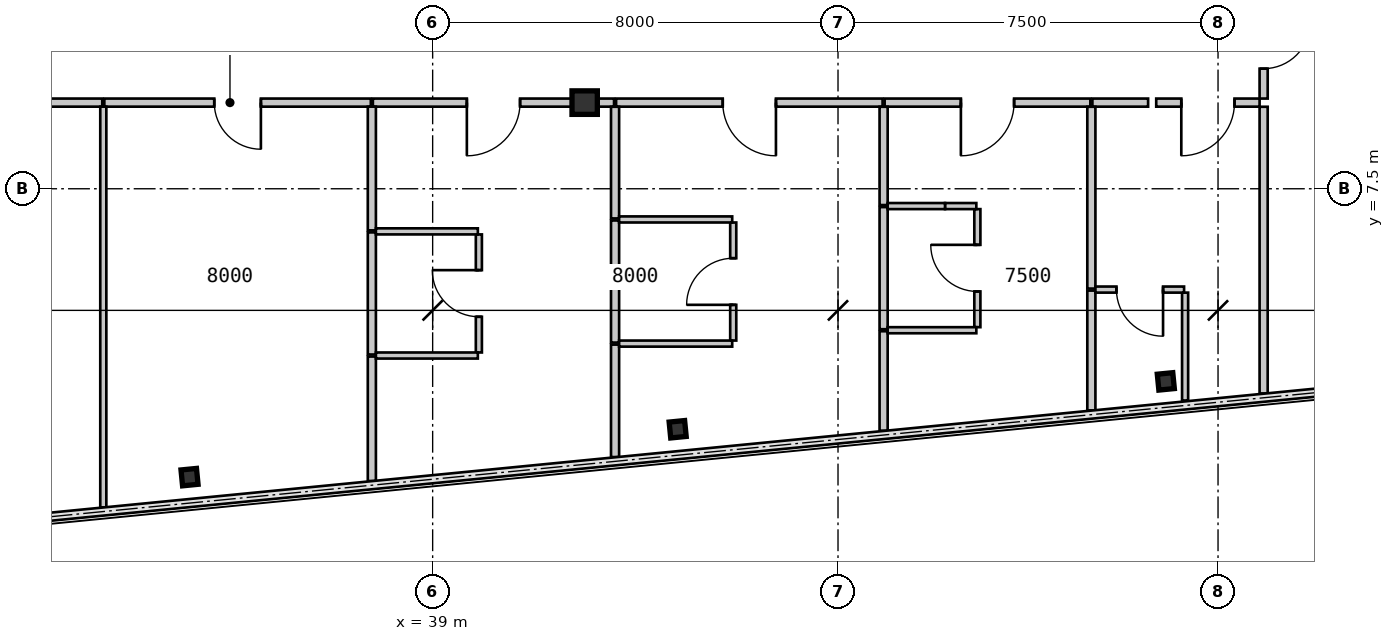
"""IFC4 building model, lengths in metres.
Left out: names, types, materials, properties, quantities, classifications, styles, units other than length and angle.
Written with IfcOpenShell. Run it as: python <this file> out.ifc"""

import sys

from ifc_helpers import new_model, si_unit, direction, frame, frame_2d, origin, origin_2d, place, context, subcontext, project, spatial, rectangle, i_section, extrude, source, transform, mapped, element, fill, save


model = new_model("IFC4")
c1 = context("Model", 3, precision=1e-05, world=origin(), true_north=direction((0.0, 1.0)))
c2 = subcontext(c1, "Body", "Model", "MODEL_VIEW")
j1 = project(units=[si_unit("LENGTHUNIT", "METRE"), si_unit("PLANEANGLEUNIT", "RADIAN")], contexts=[c1])
p1 = place(None, origin())
s1 = spatial("IfcSite", under=j1, at=p1, CompositionType="ELEMENT")
p2 = place(p1, origin())
s2 = spatial("IfcBuilding", under=s1, at=p2, CompositionType="ELEMENT")
p3 = place(p2, frame((0.0, 0.0, 68.25)))
s3 = spatial("IfcBuildingStorey", under=s2, at=p3, CompositionType="ELEMENT", Elevation=68.25)
m1 = source(origin(), c2, "Body", "SweptSolid", [
    extrude(i_section(OverallWidth=0.5, OverallDepth=0.464, WebThickness=0.022, FlangeThickness=0.034, at=origin_2d()), origin(), (0.0, 0.0, 1.0), 3.15),
])
p4 = place(p3, frame((42.0, 9.2, 0.0), z_axis=(0.0, 0.0, 1.0), x_axis=(1.0, 0.0, 0.0)))
e1 = element("IfcColumn", 1, at=p4, inside=s3, PredefinedType="COLUMN", context=c2, shape_type="MappedRepresentation", body=[
    mapped(m1, transform((0.0, 0.0, 0.0), scale=1.0)),
])
m2 = source(origin(), c2, "Body", "SweptSolid", [
    extrude(i_section(OverallWidth=0.307, OverallDepth=0.315, WebThickness=0.012, FlangeThickness=0.019, at=origin_2d()), origin(), (0.0, 0.0, 1.0), 3.15),
])
for number, where, z_axis, x_axis in (
    (2, (34.202, 1.809, 0.0), (0.0, 0.0, 1.0), (0.995, 0.098, 0.0)),
    (3, (43.835, 2.754, 0.0), (0.0, 0.0, 1.0), (0.995, 0.098, 0.0)),
    (4, (53.469, 3.698, 0.0), (0.0, 0.0, 1.0), (0.995, 0.098, 0.0)),
):
    element("IfcColumn", number, at=place(p3, frame(where, z_axis=z_axis, x_axis=x_axis)), inside=s3, PredefinedType="COLUMN", context=c2, shape_type="MappedRepresentation", body=[
        mapped(m2, transform((0.0, 0.0, 0.0), scale=1.0)),
    ])
m3 = source(origin(), c2, "Body", "SweptSolid", [
    extrude(rectangle(XDim=2.04, YDim=0.16, at=frame_2d((1.02, 0.0))), origin(), (0.0, 0.0, 1.0), 2.93),
])
p5 = place(p3, frame((55.32, 9.2, 0.0), z_axis=(0.0, 0.0, 1.0), x_axis=(-1.0, 0.0, 0.0)))
e5 = element("IfcWall", 5, at=p5, inside=s3, PredefinedType="PARTITIONING", context=c2, shape_type="MappedRepresentation", body=[
    mapped(m3, transform((0.0, 0.0, 0.0), scale=1.0)),
])
m4 = source(origin(), c2, "Body", "SweptSolid", [
    extrude(rectangle(XDim=1.05, YDim=2.1, at=frame_2d((0.525, 1.05))), frame((0.0, 0.09, 0.0), z_axis=(0.0, -1.0, 0.0), x_axis=(1.0, 0.0, 0.0)), (0.0, 0.0, 1.0), 0.18),
])
p6 = place(p5, frame((0.495, 0.0, 0.0)))
e6 = element("IfcOpeningElement", 6, at=p6, cuts=e5, PredefinedType="OPENING", context=c2, shape_type="MappedRepresentation", body=[
    mapped(m4, transform((0.0, 0.0, 0.0), scale=1.0)),
])
m5 = source(origin(), c2, "Body", "SweptSolid", [
    extrude(rectangle(XDim=2.1, YDim=0.16, at=frame_2d((1.05, 0.0))), origin(), (0.0, 0.0, 1.0), 2.93),
])
p7 = place(p3, frame((55.4, 11.38, 0.0), z_axis=(0.0, 0.0, 1.0), x_axis=(0.0, -1.0, 0.0)))
e7 = element("IfcWall", 7, at=p7, inside=s3, PredefinedType="PARTITIONING", context=c2, shape_type="MappedRepresentation", body=[
    mapped(m5, transform((0.0, 0.0, 0.0), scale=1.0)),
])
m6 = source(origin(), c2, "Body", "SweptSolid", [
    extrude(rectangle(XDim=0.92, YDim=2.1, at=frame_2d((0.46, 1.05))), frame((0.0, 0.09, 0.0), z_axis=(0.0, -1.0, 0.0), x_axis=(1.0, 0.0, 0.0)), (0.0, 0.0, 1.0), 0.18),
])
p8 = place(p7, frame((0.59, 0.0, 0.0)))
e8 = element("IfcOpeningElement", 8, at=p8, cuts=e7, PredefinedType="OPENING", context=c2, shape_type="MappedRepresentation", body=[
    mapped(m6, transform((0.0, 0.0, 0.0), scale=1.0)),
])
m7 = source(origin(), c2, "Body", "SweptSolid", [
    extrude(rectangle(XDim=4.48, YDim=0.16, at=frame_2d((2.24, 0.0))), origin(), (0.0, 0.0, 1.0), 2.328),
])
p9 = place(p3, frame((32.48, 9.2, 0.0), z_axis=(0.0, 0.0, 1.0), x_axis=(-1.0, 0.0, 0.0)))
e9 = element("IfcWall", 9, at=p9, inside=s3, PredefinedType="PARTITIONING", context=c2, shape_type="MappedRepresentation", body=[
    mapped(m7, transform((0.0, 0.0, 0.0), scale=1.0)),
])
p10 = place(p9, frame((1.97, 0.0, 0.0)))
e10 = element("IfcOpeningElement", 10, at=p10, cuts=e9, PredefinedType="OPENING", context=c2, shape_type="MappedRepresentation", body=[
    mapped(m6, transform((0.0, 0.0, 0.0), scale=1.0)),
])
m8 = source(origin(), c2, "Body", "SweptSolid", [
    extrude(rectangle(XDim=5.26, YDim=0.16, at=frame_2d((2.63, 0.0))), origin(), (0.0, 0.0, 1.0), 2.328),
])
p11 = place(p3, frame((37.78, 9.2, 0.0), z_axis=(0.0, 0.0, 1.0), x_axis=(-1.0, 0.0, 0.0)))
e11 = element("IfcWall", 11, at=p11, inside=s3, PredefinedType="PARTITIONING", context=c2, shape_type="MappedRepresentation", body=[
    mapped(m8, transform((0.0, 0.0, 0.0), scale=1.0)),
])
p12 = place(p11, frame((2.17, 0.0, 0.0)))
e12 = element("IfcOpeningElement", 12, at=p12, cuts=e11, PredefinedType="OPENING", context=c2, shape_type="MappedRepresentation", body=[
    mapped(m6, transform((0.0, 0.0, 0.0), scale=1.0)),
])
m9 = source(origin(), c2, "Body", "SweptSolid", [
    extrude(rectangle(XDim=0.58, YDim=0.16, at=frame_2d((0.29, 0.0))), origin(), (0.0, 0.0, 1.0), 2.93),
])
p13 = place(p3, frame((42.58, 9.2, 0.0), z_axis=(0.0, 0.0, 1.0), x_axis=(-1.0, 0.0, 0.0)))
e13 = element("IfcWall", 13, at=p13, inside=s3, PredefinedType="PARTITIONING", context=c2, shape_type="MappedRepresentation", body=[
    mapped(m9, transform((0.0, 0.0, 0.0), scale=1.0)),
])
m10 = source(origin(), c2, "Body", "SweptSolid", [
    extrude(rectangle(XDim=4.18, YDim=0.16, at=frame_2d((2.09, 0.0))), origin(), (0.0, 0.0, 1.0), 2.328),
])
p14 = place(p3, frame((42.0, 9.2, 0.0), z_axis=(0.0, 0.0, 1.0), x_axis=(-1.0, 0.0, 0.0)))
e14 = element("IfcWall", 14, at=p14, inside=s3, PredefinedType="PARTITIONING", context=c2, shape_type="MappedRepresentation", body=[
    mapped(m10, transform((0.0, 0.0, 0.0), scale=1.0)),
])
p15 = place(p14, frame((1.275, 0.0, 0.0)))
e15 = element("IfcOpeningElement", 15, at=p15, cuts=e14, PredefinedType="OPENING", context=c2, shape_type="MappedRepresentation", body=[
    mapped(m4, transform((0.0, 0.0, 0.0), scale=1.0)),
])
m11 = source(origin(), c2, "Body", "SweptSolid", [
    extrude(rectangle(XDim=5.259, YDim=0.16, at=frame_2d((2.63, 0.0))), origin(), (0.0, 0.0, 1.0), 2.93),
])
p16 = place(p3, frame((47.88, 9.2, 0.0), z_axis=(0.0, 0.0, 1.0), x_axis=(-1.0, 0.0, 0.0)))
e16 = element("IfcWall", 16, at=p16, inside=s3, PredefinedType="PARTITIONING", context=c2, shape_type="MappedRepresentation", body=[
    mapped(m11, transform((0.0, 0.0, 0.0), scale=1.0)),
])
p17 = place(p16, frame((2.105, 0.0, 0.0)))
e17 = element("IfcOpeningElement", 17, at=p17, cuts=e16, PredefinedType="OPENING", context=c2, shape_type="MappedRepresentation", body=[
    mapped(m4, transform((0.0, 0.0, 0.0), scale=1.0)),
])
m12 = source(origin(), c2, "Body", "SweptSolid", [
    extrude(rectangle(XDim=4.059, YDim=0.16, at=frame_2d((2.03, 0.0))), origin(), (0.0, 0.0, 1.0), 2.93),
])
p18 = place(p3, frame((51.98, 9.2, 0.0), z_axis=(0.0, 0.0, 1.0), x_axis=(-1.0, 0.0, 0.0)))
e18 = element("IfcWall", 18, at=p18, inside=s3, PredefinedType="PARTITIONING", context=c2, shape_type="MappedRepresentation", body=[
    mapped(m12, transform((0.0, 0.0, 0.0), scale=1.0)),
])
p19 = place(p18, frame((1.505, 0.0, 0.0)))
e19 = element("IfcOpeningElement", 19, at=p19, cuts=e18, PredefinedType="OPENING", context=c2, shape_type="MappedRepresentation", body=[
    mapped(m4, transform((0.0, 0.0, 0.0), scale=1.0)),
])
m13 = source(origin(), c2, "Body", "SweptSolid", [
    extrude(rectangle(XDim=1.1, YDim=0.16, at=frame_2d((0.55, 0.0))), origin(), (0.0, 0.0, 1.0), 2.93),
])
p20 = place(p3, frame((53.12, 9.2, 0.0), z_axis=(0.0, 0.0, 1.0), x_axis=(-1.0, 0.0, 0.0)))
e20 = element("IfcWall", 20, at=p20, inside=s3, PredefinedType="PARTITIONING", context=c2, shape_type="MappedRepresentation", body=[
    mapped(m13, transform((0.0, 0.0, 0.0), scale=1.0)),
])
m14 = source(origin(), c2, "Body", "SweptSolid", [
    extrude(rectangle(XDim=7.907, YDim=0.12, at=frame_2d((3.954, 0.0))), origin(), (0.0, 0.0, 1.0), 2.93),
])
p21 = place(p3, frame((32.5, 9.12, 0.0), z_axis=(0.0, 0.0, 1.0), x_axis=(0.0, -1.0, 0.0)))
e21 = element("IfcWall", 21, at=p21, inside=s3, PredefinedType="PARTITIONING", context=c2, shape_type="MappedRepresentation", body=[
    mapped(m14, transform((0.0, 0.0, 0.0), scale=1.0)),
])
m15 = source(origin(), c2, "Body", "SweptSolid", [
    extrude(rectangle(XDim=2.456, YDim=0.16, at=frame_2d((1.228, 0.0))), origin(), (0.0, 0.0, 1.0), 2.93),
])
p22 = place(p3, frame((37.8, 4.189, 0.0), z_axis=(0.0, 0.0, 1.0), x_axis=(0.0, -1.0, 0.0)))
e22 = element("IfcWall", 22, at=p22, inside=s3, PredefinedType="PARTITIONING", context=c2, shape_type="MappedRepresentation", body=[
    mapped(m15, transform((0.0, 0.0, 0.0), scale=1.0)),
])
m16 = source(origin(), c2, "Body", "SweptSolid", [
    extrude(rectangle(XDim=2.441, YDim=0.16, at=frame_2d((1.22, 0.0))), origin(), (0.0, 0.0, 1.0), 2.93),
])
p23 = place(p3, frame((37.8, 9.12, 0.0), z_axis=(0.0, 0.0, 1.0), x_axis=(0.0, -1.0, 0.0)))
e23 = element("IfcWall", 23, at=p23, inside=s3, PredefinedType="PARTITIONING", context=c2, shape_type="MappedRepresentation", body=[
    mapped(m16, transform((0.0, 0.0, 0.0), scale=1.0)),
])
m17 = source(origin(), c2, "Body", "SweptSolid", [
    extrude(rectangle(XDim=2.41, YDim=0.16, at=frame_2d((1.205, 0.0))), origin(), (0.0, 0.0, 1.0), 2.93),
])
p24 = place(p3, frame((37.8, 6.639, 0.0), z_axis=(0.0, 0.0, 1.0), x_axis=(0.0, -1.0, 0.0)))
e24 = element("IfcWall", 24, at=p24, inside=s3, PredefinedType="PARTITIONING", context=c2, shape_type="MappedRepresentation", body=[
    mapped(m17, transform((0.0, 0.0, 0.0), scale=1.0)),
])
m18 = source(origin(), c2, "Body", "SweptSolid", [
    extrude(rectangle(XDim=2.33, YDim=0.12, at=frame_2d((1.165, 0.0))), origin(), (0.0, 0.0, 1.0), 2.93),
])
p25 = place(p3, frame((39.912, 4.269, 0.0), z_axis=(0.0, 0.0, 1.0), x_axis=(0.0, 1.0, 0.0)))
e25 = element("IfcWall", 25, at=p25, inside=s3, PredefinedType="PARTITIONING", context=c2, shape_type="MappedRepresentation", body=[
    mapped(m18, transform((0.0, 0.0, 0.0), scale=1.0)),
])
m19 = source(origin(), c2, "Body", "SweptSolid", [
    extrude(rectangle(XDim=0.92, YDim=2.1, at=frame_2d((0.46, 1.05))), frame((0.0, 0.07, 0.0), z_axis=(0.0, -1.0, 0.0), x_axis=(1.0, 0.0, 0.0)), (0.0, 0.0, 1.0), 0.14),
])
p26 = place(p25, frame((0.705, 0.0, 0.0)))
e26 = element("IfcOpeningElement", 26, at=p26, cuts=e25, PredefinedType="OPENING", context=c2, shape_type="MappedRepresentation", body=[
    mapped(m19, transform((0.0, 0.0, 0.0), scale=1.0)),
])
m20 = source(origin(), c2, "Body", "SweptSolid", [
    extrude(rectangle(XDim=2.012, YDim=0.12, at=frame_2d((1.006, 0.0))), origin(), (0.0, 0.0, 1.0), 2.93),
])
for number, where, z_axis, x_axis in (
    (27, (37.88, 4.209, 0.0), (0.0, 0.0, 1.0), (1.0, 0.0, 0.0)),
    (28, (39.892, 6.659, 0.0), (0.0, 0.0, 1.0), (-1.0, 0.0, 0.0)),
):
    element("IfcWall", number, at=place(p3, frame(where, z_axis=z_axis, x_axis=x_axis)), inside=s3, PredefinedType="PARTITIONING", context=c2, shape_type="MappedRepresentation", body=[
        mapped(m20, transform((0.0, 0.0, 0.0), scale=1.0)),
    ])
m21 = source(origin(), c2, "Body", "SweptSolid", [
    extrude(rectangle(XDim=2.219, YDim=0.16, at=frame_2d((1.11, 0.0))), origin(), (0.0, 0.0, 1.0), 2.93),
])
p27 = place(p3, frame((42.6, 4.424, 0.0), z_axis=(0.0, 0.0, 1.0), x_axis=(0.0, -1.0, 0.0)))
e29 = element("IfcWall", 29, at=p27, inside=s3, PredefinedType="PARTITIONING", context=c2, shape_type="MappedRepresentation", body=[
    mapped(m21, transform((0.0, 0.0, 0.0), scale=1.0)),
])
m22 = source(origin(), c2, "Body", "SweptSolid", [
    extrude(rectangle(XDim=2.203, YDim=0.16, at=frame_2d((1.102, 0.0))), origin(), (0.0, 0.0, 1.0), 2.93),
])
p28 = place(p3, frame((42.6, 9.118, 0.0), z_axis=(0.0, 0.0, 1.0), x_axis=(0.0, -1.0, 0.0)))
e30 = element("IfcWall", 30, at=p28, inside=s3, PredefinedType="PARTITIONING", context=c2, shape_type="MappedRepresentation", body=[
    mapped(m22, transform((0.0, 0.0, 0.0), scale=1.0)),
])
m23 = source(origin(), c2, "Body", "SweptSolid", [
    extrude(rectangle(XDim=2.409, YDim=0.16, at=frame_2d((1.205, 0.0))), origin(), (0.0, 0.0, 1.0), 2.93),
])
p29 = place(p3, frame((42.6, 6.874, 0.0), z_axis=(0.0, 0.0, 1.0), x_axis=(0.0, -1.0, 0.0)))
e31 = element("IfcWall", 31, at=p29, inside=s3, PredefinedType="PARTITIONING", context=c2, shape_type="MappedRepresentation", body=[
    mapped(m23, transform((0.0, 0.0, 0.0), scale=1.0)),
])
m24 = source(origin(), c2, "Body", "SweptSolid", [
    extrude(rectangle(XDim=2.33, YDim=0.12, at=frame_2d((1.165, 0.0))), origin(), (0.0, 0.0, 1.0), 2.93),
])
p30 = place(p3, frame((44.932, 4.504, 0.0), z_axis=(0.0, 0.0, 1.0), x_axis=(0.0, 1.0, 0.0)))
e32 = element("IfcWall", 32, at=p30, inside=s3, PredefinedType="PARTITIONING", context=c2, shape_type="MappedRepresentation", body=[
    mapped(m24, transform((0.0, 0.0, 0.0), scale=1.0)),
])
p31 = place(p30, frame((0.705, 0.0, 0.0)))
e33 = element("IfcOpeningElement", 33, at=p31, cuts=e32, PredefinedType="OPENING", context=c2, shape_type="MappedRepresentation", body=[
    mapped(m19, transform((0.0, 0.0, 0.0), scale=1.0)),
])
m25 = source(origin(), c2, "Body", "SweptSolid", [
    extrude(rectangle(XDim=2.232, YDim=0.12, at=frame_2d((1.116, 0.0))), origin(), (0.0, 0.0, 1.0), 2.93),
])
for number, where, z_axis, x_axis in (
    (34, (42.68, 4.444, 0.0), (0.0, 0.0, 1.0), (1.0, 0.0, 0.0)),
    (35, (44.912, 6.894, 0.0), (0.0, 0.0, 1.0), (-1.0, 0.0, 0.0)),
):
    element("IfcWall", number, at=place(p3, frame(where, z_axis=z_axis, x_axis=x_axis)), inside=s3, PredefinedType="PARTITIONING", context=c2, shape_type="MappedRepresentation", body=[
        mapped(m25, transform((0.0, 0.0, 0.0), scale=1.0)),
    ])
m26 = source(origin(), c2, "Body", "SweptSolid", [
    extrude(rectangle(XDim=1.963, YDim=0.16, at=frame_2d((0.982, 0.0))), origin(), (0.0, 0.0, 1.0), 2.93),
])
p32 = place(p3, frame((47.9, 4.688, 0.0), z_axis=(0.0, 0.0, 1.0), x_axis=(0.0, -1.0, 0.0)))
e36 = element("IfcWall", 36, at=p32, inside=s3, PredefinedType="PARTITIONING", context=c2, shape_type="MappedRepresentation", body=[
    mapped(m26, transform((0.0, 0.0, 0.0), scale=1.0)),
])
m27 = source(origin(), c2, "Body", "SweptSolid", [
    extrude(rectangle(XDim=1.939, YDim=0.16, at=frame_2d((0.97, 0.0))), origin(), (0.0, 0.0, 1.0), 2.93),
])
p33 = place(p3, frame((47.9, 9.118, 0.0), z_axis=(0.0, 0.0, 1.0), x_axis=(0.0, -1.0, 0.0)))
e37 = element("IfcWall", 37, at=p33, inside=s3, PredefinedType="PARTITIONING", context=c2, shape_type="MappedRepresentation", body=[
    mapped(m27, transform((0.0, 0.0, 0.0), scale=1.0)),
])
m28 = source(origin(), c2, "Body", "SweptSolid", [
    extrude(rectangle(XDim=2.41, YDim=0.16, at=frame_2d((1.205, 0.0))), origin(), (0.0, 0.0, 1.0), 2.93),
])
p34 = place(p3, frame((47.9, 7.138, 0.0), z_axis=(0.0, 0.0, 1.0), x_axis=(0.0, -1.0, 0.0)))
e38 = element("IfcWall", 38, at=p34, inside=s3, PredefinedType="PARTITIONING", context=c2, shape_type="MappedRepresentation", body=[
    mapped(m28, transform((0.0, 0.0, 0.0), scale=1.0)),
])
p35 = place(p3, frame((49.75, 4.768, 0.0), z_axis=(0.0, 0.0, 1.0), x_axis=(0.0, 1.0, 0.0)))
e39 = element("IfcWall", 39, at=p35, inside=s3, PredefinedType="PARTITIONING", context=c2, shape_type="MappedRepresentation", body=[
    mapped(m18, transform((0.0, 0.0, 0.0), scale=1.0)),
])
p36 = place(p35, frame((0.705, 0.0, 0.0)))
e40 = element("IfcOpeningElement", 40, at=p36, cuts=e39, PredefinedType="OPENING", context=c2, shape_type="MappedRepresentation", body=[
    mapped(m19, transform((0.0, 0.0, 0.0), scale=1.0)),
])
m29 = source(origin(), c2, "Body", "SweptSolid", [
    extrude(rectangle(XDim=1.75, YDim=0.12, at=frame_2d((0.875, 0.0))), origin(), (0.0, 0.0, 1.0), 2.93),
])
p37 = place(p3, frame((47.98, 4.708, 0.0), z_axis=(0.0, 0.0, 1.0), x_axis=(1.0, 0.0, 0.0)))
e41 = element("IfcWall", 41, at=p37, inside=s3, PredefinedType="PARTITIONING", context=c2, shape_type="MappedRepresentation", body=[
    mapped(m29, transform((0.0, 0.0, 0.0), scale=1.0)),
])
m30 = source(origin(), c2, "Body", "SweptSolid", [
    extrude(rectangle(XDim=0.618, YDim=0.12, at=frame_2d((0.309, 0.0))), origin(), (0.0, 0.0, 1.0), 2.93),
])
p38 = place(p3, frame((49.73, 7.158, 0.0), z_axis=(0.0, 0.0, 1.0), x_axis=(-1.0, 0.0, 0.0)))
e42 = element("IfcWall", 42, at=p38, inside=s3, PredefinedType="PARTITIONING", context=c2, shape_type="MappedRepresentation", body=[
    mapped(m30, transform((0.0, 0.0, 0.0), scale=1.0)),
])
m31 = source(origin(), c2, "Body", "SweptSolid", [
    extrude(rectangle(XDim=1.132, YDim=0.12, at=frame_2d((0.566, 0.0))), origin(), (0.0, 0.0, 1.0), 2.47),
])
p39 = place(p3, frame((49.112, 7.158, 0.0), z_axis=(0.0, 0.0, 1.0), x_axis=(-1.0, 0.0, 0.0)))
e43 = element("IfcWall", 43, at=p39, inside=s3, PredefinedType="PARTITIONING", context=c2, shape_type="MappedRepresentation", body=[
    mapped(m31, transform((0.0, 0.0, 0.0), scale=1.0)),
])
m32 = source(origin(), c2, "Body", "SweptSolid", [
    extrude(rectangle(XDim=3.587, YDim=0.16, at=frame_2d((1.794, 0.0))), origin(), (0.0, 0.0, 1.0), 2.93),
])
p40 = place(p3, frame((52.0, 9.118, 0.0), z_axis=(0.0, 0.0, 1.0), x_axis=(0.0, -1.0, 0.0)))
e44 = element("IfcWall", 44, at=p40, inside=s3, PredefinedType="PARTITIONING", context=c2, shape_type="MappedRepresentation", body=[
    mapped(m32, transform((0.0, 0.0, 0.0), scale=1.0)),
])
m33 = source(origin(), c2, "Body", "SweptSolid", [
    extrude(rectangle(XDim=2.364, YDim=0.16, at=frame_2d((1.182, 0.0))), origin(), (0.0, 0.0, 1.0), 2.93),
])
p41 = place(p3, frame((52.0, 5.49, 0.0), z_axis=(0.0, 0.0, 1.0), x_axis=(0.0, -1.0, 0.0)))
e45 = element("IfcWall", 45, at=p41, inside=s3, PredefinedType="PARTITIONING", context=c2, shape_type="MappedRepresentation", body=[
    mapped(m33, transform((0.0, 0.0, 0.0), scale=1.0)),
])
m34 = source(origin(), c2, "Body", "SweptSolid", [
    extrude(rectangle(XDim=2.128, YDim=0.12, at=frame_2d((1.064, 0.0))), origin(), (0.0, 0.0, 1.0), 2.93),
])
p42 = place(p3, frame((53.85, 3.322, 0.0), z_axis=(0.0, 0.0, 1.0), x_axis=(0.0, 1.0, 0.0)))
e46 = element("IfcWall", 46, at=p42, inside=s3, PredefinedType="PARTITIONING", context=c2, shape_type="MappedRepresentation", body=[
    mapped(m34, transform((0.0, 0.0, 0.0), scale=1.0)),
])
p43 = place(p3, frame((53.83, 5.51, 0.0), z_axis=(0.0, 0.0, 1.0), x_axis=(-1.0, 0.0, 0.0)))
e47 = element("IfcWall", 47, at=p43, inside=s3, PredefinedType="PARTITIONING", context=c2, shape_type="MappedRepresentation", body=[
    mapped(m29, transform((0.0, 0.0, 0.0), scale=1.0)),
])
p44 = place(p43, frame((0.415, 0.0, 0.0)))
e48 = element("IfcOpeningElement", 48, at=p44, cuts=e47, PredefinedType="OPENING", context=c2, shape_type="MappedRepresentation", body=[
    mapped(m19, transform((0.0, 0.0, 0.0), scale=1.0)),
])
m35 = source(origin(), c2, "Body", "SweptSolid", [
    extrude(rectangle(XDim=5.658, YDim=0.16, at=frame_2d((2.829, 0.0))), origin(), (0.0, 0.0, 1.0), 2.93),
])
p45 = place(p3, frame((55.4, 9.118, 0.0), z_axis=(0.0, 0.0, 1.0), x_axis=(0.0, -1.0, 0.0)))
e49 = element("IfcWall", 49, at=p45, inside=s3, PredefinedType="PARTITIONING", context=c2, shape_type="MappedRepresentation", body=[
    mapped(m35, transform((0.0, 0.0, 0.0), scale=1.0)),
])
m36 = source(origin(), c2, "Body", "SweptSolid", [
    extrude(rectangle(XDim=1.05, YDim=2.1, at=frame_2d((0.525, 1.05))), frame((0.0, 0.025, 0.0), z_axis=(0.0, -1.0, 0.0), x_axis=(1.0, 0.0, 0.0)), (0.0, 0.0, 1.0), 0.05),
])
p46 = place(p6, origin())
e50 = element("IfcDoor", 50, at=p46, inside=s3, OperationType="SINGLE_SWING_RIGHT", PredefinedType="DOOR", context=c2, shape_type="MappedRepresentation", body=[
    mapped(m36, transform((0.0, 0.0, 0.0), scale=1.0)),
])
fill(e6, e50)
m37 = source(origin(), c2, "Body", "SweptSolid", [
    extrude(rectangle(XDim=0.92, YDim=2.1, at=frame_2d((0.46, 1.05))), frame((0.0, 0.025, 0.0), z_axis=(0.0, -1.0, 0.0), x_axis=(1.0, 0.0, 0.0)), (0.0, 0.0, 1.0), 0.05),
])
p47 = place(p8, origin())
e51 = element("IfcDoor", 51, at=p47, inside=s3, OperationType="SINGLE_SWING_LEFT", PredefinedType="DOOR", context=c2, shape_type="MappedRepresentation", body=[
    mapped(m37, transform((0.0, 0.0, 0.0), scale=1.0)),
])
fill(e8, e51)
p48 = place(p12, origin())
e52 = element("IfcDoor", 52, at=p48, inside=s3, OperationType="SINGLE_SWING_LEFT", PredefinedType="DOOR", context=c2, shape_type="MappedRepresentation", body=[
    mapped(m37, transform((0.0, 0.0, 0.0), scale=1.0)),
])
fill(e12, e52)
p49 = place(p15, origin())
e53 = element("IfcDoor", 53, at=p49, inside=s3, OperationType="SINGLE_SWING_RIGHT", PredefinedType="DOOR", context=c2, shape_type="MappedRepresentation", body=[
    mapped(m36, transform((0.0, 0.0, 0.0), scale=1.0)),
])
fill(e15, e53)
p50 = place(p17, origin())
e54 = element("IfcDoor", 54, at=p50, inside=s3, OperationType="SINGLE_SWING_LEFT", PredefinedType="DOOR", context=c2, shape_type="MappedRepresentation", body=[
    mapped(m36, transform((0.0, 0.0, 0.0), scale=1.0)),
])
fill(e17, e54)
p51 = place(p19, origin())
e55 = element("IfcDoor", 55, at=p51, inside=s3, OperationType="SINGLE_SWING_RIGHT", PredefinedType="DOOR", context=c2, shape_type="MappedRepresentation", body=[
    mapped(m36, transform((0.0, 0.0, 0.0), scale=1.0)),
])
fill(e19, e55)
p52 = place(p26, origin())
e56 = element("IfcDoor", 56, at=p52, inside=s3, OperationType="SINGLE_SWING_RIGHT", PredefinedType="DOOR", context=c2, shape_type="MappedRepresentation", body=[
    mapped(m37, transform((0.0, 0.0, 0.0), scale=1.0)),
])
fill(e26, e56)
p53 = place(p31, origin())
e57 = element("IfcDoor", 57, at=p53, inside=s3, OperationType="SINGLE_SWING_LEFT", PredefinedType="DOOR", context=c2, shape_type="MappedRepresentation", body=[
    mapped(m37, transform((0.0, 0.0, 0.0), scale=1.0)),
])
fill(e33, e57)
p54 = place(p36, origin())
e58 = element("IfcDoor", 58, at=p54, inside=s3, OperationType="SINGLE_SWING_RIGHT", PredefinedType="DOOR", context=c2, shape_type="MappedRepresentation", body=[
    mapped(m37, transform((0.0, 0.0, 0.0), scale=1.0)),
])
fill(e40, e58)
p55 = place(p44, origin())
e59 = element("IfcDoor", 59, at=p55, inside=s3, OperationType="SINGLE_SWING_LEFT", PredefinedType="DOOR", context=c2, shape_type="MappedRepresentation", body=[
    mapped(m37, transform((0.0, 0.0, 0.0), scale=1.0)),
])
fill(e48, e59)
save(model, sys.argv[1])
